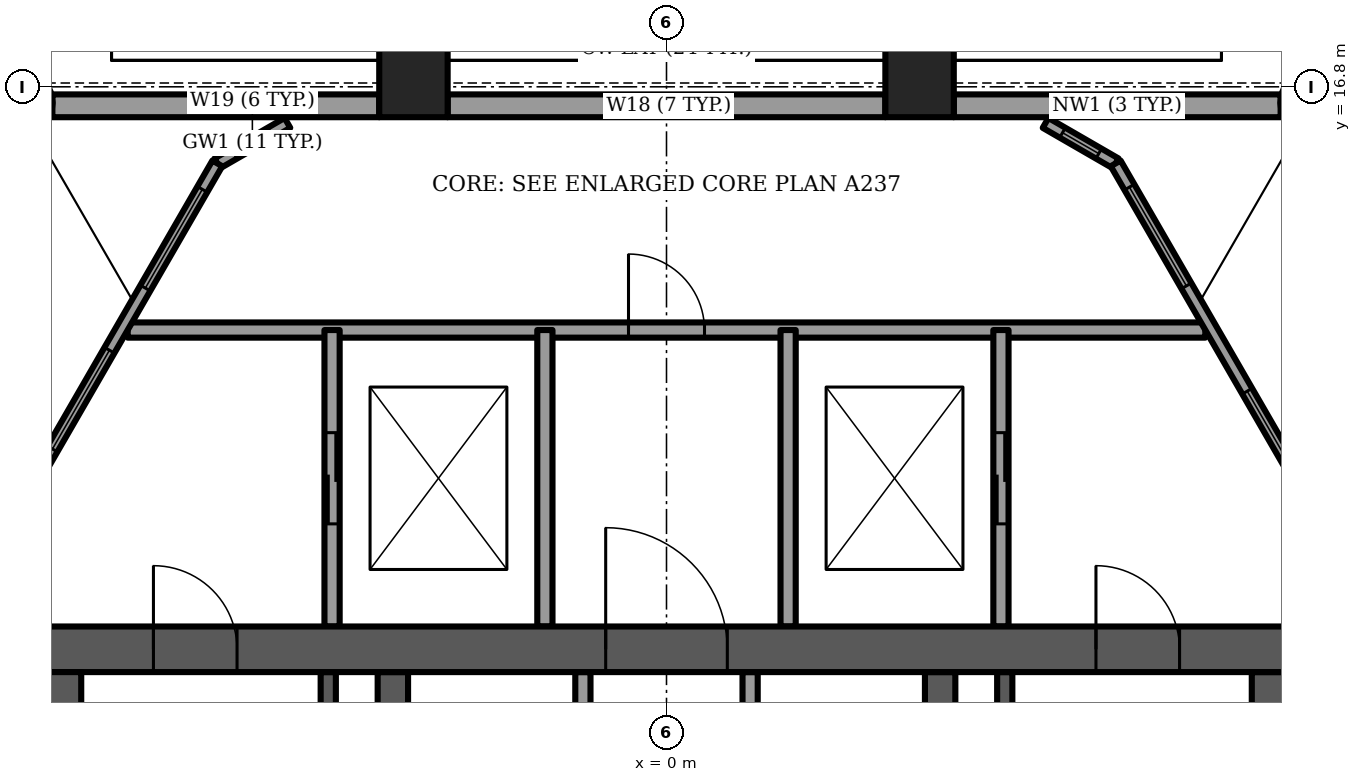
"""IFC4 building model, lengths in metres.
Left out: names, types, materials, properties, quantities, classifications, styles, units other than length and angle.
Written with IfcOpenShell. Run it as: python <this file> out.ifc"""

import sys

from ifc_helpers import new_model, si_unit, direction, frame, frame_2d, origin, origin_2d, place, context, subcontext, project, spatial, rectangle, circle, extrude, element, fill, save


model = new_model("IFC4")
c1 = context("Model", 3, precision=1e-05, world=origin(), true_north=direction((0.0, 1.0)))
c2 = subcontext(c1, "Body", "Model", "MODEL_VIEW")
j1 = project(units=[si_unit("LENGTHUNIT", "METRE"), si_unit("PLANEANGLEUNIT", "RADIAN")], contexts=[c1])
p1 = place(None, origin())
s1 = spatial("IfcSite", under=j1, at=p1, CompositionType="ELEMENT")
p2 = place(p1, origin())
s2 = spatial("IfcBuilding", under=s1, at=p2, CompositionType="ELEMENT")
p3 = place(p2, frame((0.0, 0.0, 256.25)))
s3 = spatial("IfcBuildingStorey", under=s2, at=p3, CompositionType="ELEMENT", Elevation=256.25)
for number, where, z_axis, x_axis in (
    (1, (-8.526, 16.589, -1.2), (0.0, 0.0, 1.0), (1.0, 0.0, 0.0)),
    (2, (8.526, 16.589, -1.2), (0.0, 0.0, 1.0), (1.0, 0.0, 0.0)),
):
    element("IfcColumn", number, at=place(p3, frame(where, z_axis=z_axis, x_axis=x_axis)), inside=s3, PredefinedType="COLUMN", context=c2, shape_type="SweptSolid", body=[
        extrude(circle(Radius=0.45, at=origin_2d()), origin(), (0.0, 0.0, 1.0), 3.75),
    ])
for number, where, z_axis, x_axis in (
    (3, (3.329, 16.85, -1.2), (0.0, 0.0, 1.0), (1.0, 0.0, 0.0)),
    (4, (-3.329, 16.85, -1.2), (0.0, 0.0, 1.0), (1.0, 0.0, 0.0)),
):
    element("IfcColumn", number, at=place(p3, frame(where, z_axis=z_axis, x_axis=x_axis)), inside=s3, PredefinedType="COLUMN", context=c2, shape_type="SweptSolid", body=[
        extrude(rectangle(XDim=0.9, YDim=0.9, at=origin_2d()), origin(), (0.0, 0.0, 1.0), 3.75),
    ])
p4 = place(p3, frame((-8.5, 9.4, -0.3), z_axis=(0.0, 0.0, 1.0), x_axis=(1.0, 0.0, 0.0)))
e5 = element("IfcWall", 5, at=p4, inside=s3, PredefinedType="SHEAR", context=c2, shape_type="SweptSolid", body=[
    extrude(rectangle(XDim=17.0, YDim=0.6, at=frame_2d((8.5, 0.0))), origin(), (0.0, 0.0, 1.0), 3.75),
])
p5 = place(p4, frame((7.7, 0.0, 0.0)))
e6 = element("IfcOpeningElement", 6, at=p5, cuts=e5, PredefinedType="OPENING", context=c2, shape_type="SweptSolid", body=[
    extrude(rectangle(XDim=1.6, YDim=2.1, at=frame_2d((0.8, 1.05))), frame((0.0, 0.3, 0.0), z_axis=(0.0, -1.0, 0.0), x_axis=(1.0, 0.0, 0.0)), (0.0, 0.0, 1.0), 0.6),
])
p6 = place(p4, frame((1.75, 0.0, 0.0)))
e7 = element("IfcOpeningElement", 7, at=p6, cuts=e5, PredefinedType="OPENING", context=c2, shape_type="SweptSolid", body=[
    extrude(rectangle(XDim=1.1, YDim=2.1, at=frame_2d((0.55, 1.05))), frame((0.0, 0.3, 0.0), z_axis=(0.0, -1.0, 0.0), x_axis=(1.0, 0.0, 0.0)), (0.0, 0.0, 1.0), 0.6),
])
p7 = place(p4, frame((14.15, 0.0, 0.0)))
e8 = element("IfcOpeningElement", 8, at=p7, cuts=e5, PredefinedType="OPENING", context=c2, shape_type="SweptSolid", body=[
    extrude(rectangle(XDim=1.1, YDim=2.1, at=frame_2d((0.55, 1.05))), frame((0.0, 0.3, 0.0), z_axis=(0.0, -1.0, 0.0), x_axis=(1.0, 0.0, 0.0)), (0.0, 0.0, 1.0), 0.6),
])
p8 = place(p3, frame((-8.1, -1.1, -0.3), z_axis=(0.0, 0.0, 1.0), x_axis=(0.0, 1.0, 0.0)))
e9 = element("IfcWall", 9, at=p8, inside=s3, PredefinedType="SHEAR", context=c2, shape_type="SweptSolid", body=[
    extrude(rectangle(XDim=10.2, YDim=0.8, at=frame_2d((5.1, 0.0))), origin(), (0.0, 0.0, 1.0), 3.75),
])
p9 = place(p8, frame((8.35, 0.0, 0.0)))
e10 = element("IfcOpeningElement", 10, at=p9, cuts=e9, PredefinedType="OPENING", context=c2, shape_type="SweptSolid", body=[
    extrude(rectangle(XDim=1.1, YDim=2.1, at=frame_2d((0.55, 1.05))), frame((0.0, 0.4, 0.0), z_axis=(0.0, -1.0, 0.0), x_axis=(1.0, 0.0, 0.0)), (0.0, 0.0, 1.0), 0.8),
])
p10 = place(p3, frame((8.1, -1.1, -0.3), z_axis=(0.0, 0.0, 1.0), x_axis=(0.0, 1.0, 0.0)))
e11 = element("IfcWall", 11, at=p10, inside=s3, PredefinedType="SHEAR", context=c2, shape_type="SweptSolid", body=[
    extrude(rectangle(XDim=10.2, YDim=0.8, at=frame_2d((5.1, 0.0))), origin(), (0.0, 0.0, 1.0), 3.75),
])
p11 = place(p10, frame((8.35, 0.0, 0.0)))
e12 = element("IfcOpeningElement", 12, at=p11, cuts=e11, PredefinedType="OPENING", context=c2, shape_type="SweptSolid", body=[
    extrude(rectangle(XDim=1.1, YDim=2.1, at=frame_2d((0.55, 1.05))), frame((0.0, 0.4, 0.0), z_axis=(0.0, -1.0, 0.0), x_axis=(1.0, 0.0, 0.0)), (0.0, 0.0, 1.0), 0.8),
])
for number, where, z_axis, x_axis in (
    (13, (-3.6, -1.1, -0.3), (0.0, 0.0, 1.0), (0.0, 1.0, 0.0)),
    (14, (3.6, -1.1, -0.3), (0.0, 0.0, 1.0), (0.0, 1.0, 0.0)),
):
    element("IfcWall", number, at=place(p3, frame(where, z_axis=z_axis, x_axis=x_axis)), inside=s3, PredefinedType="SHEAR", context=c2, shape_type="SweptSolid", body=[
        extrude(rectangle(XDim=10.2, YDim=0.4, at=frame_2d((5.1, 0.0))), origin(), (0.0, 0.0, 1.0), 3.75),
    ])
p12 = place(p3, frame((8.079, 16.55, 0.0), z_axis=(0.0, 0.0, 1.0), x_axis=(-1.0, 0.0, 0.0)))
e15 = element("IfcWall", 15, at=p12, inside=s3, PredefinedType="SOLIDWALL", context=c2, shape_type="SweptSolid", body=[
    extrude(rectangle(XDim=4.3, YDim=0.3, at=frame_2d((2.15, 0.0))), origin(), (0.0, 0.0, 1.0), 2.55),
])
p13 = place(p3, frame((2.879, 16.55, 0.0), z_axis=(0.0, 0.0, 1.0), x_axis=(-1.0, 0.0, 0.0)))
e16 = element("IfcWall", 16, at=p13, inside=s3, PredefinedType="SOLIDWALL", context=c2, shape_type="SweptSolid", body=[
    extrude(rectangle(XDim=5.759, YDim=0.3, at=frame_2d((2.879, 0.0))), origin(), (0.0, 0.0, 1.0), 2.55),
])
p14 = place(p13, frame((2.4, 0.0, 0.15)))
e17 = element("IfcOpeningElement", 17, at=p14, cuts=e16, PredefinedType="OPENING", context=c2, shape_type="SweptSolid", body=[
    extrude(rectangle(XDim=0.9, YDim=2.15, at=frame_2d((0.45, 1.075))), frame((0.0, 0.15, 0.0), z_axis=(0.0, -1.0, 0.0), x_axis=(1.0, 0.0, 0.0)), (0.0, 0.0, 1.0), 0.3),
])
p15 = place(p3, frame((-3.779, 16.55, 0.0), z_axis=(0.0, 0.0, 1.0), x_axis=(-1.0, 0.0, 0.0)))
e18 = element("IfcWall", 18, at=p15, inside=s3, PredefinedType="SOLIDWALL", context=c2, shape_type="SweptSolid", body=[
    extrude(rectangle(XDim=4.3, YDim=0.3, at=frame_2d((2.15, 0.0))), origin(), (0.0, 0.0, 1.0), 2.55),
])
p16 = place(p3, frame((-5.909, 15.792, 0.0), z_axis=(0.0, 0.0, 1.0), x_axis=(-0.500006153997, -0.866021850744, 0.0)))
e19 = element("IfcWall", 19, at=p16, inside=s3, PredefinedType="SOLIDWALL", context=c2, shape_type="SweptSolid", body=[
    extrude(rectangle(XDim=18.673, YDim=0.15, at=frame_2d((9.336, 0.0))), origin(), (0.0, 0.0, 1.0), 3.45),
])
p17 = place(p16, frame((2.838, 0.0, 0.15)))
e20 = element("IfcOpeningElement", 20, at=p17, cuts=e19, PredefinedType="OPENING", context=c2, shape_type="SweptSolid", body=[
    extrude(rectangle(XDim=1.5, YDim=2.85, at=frame_2d((0.75, 1.425))), frame((0.0, 0.075, 0.0), z_axis=(0.0, -1.0, 0.0), x_axis=(1.0, 0.0, 0.0)), (0.0, 0.0, 1.0), 0.15),
])
p18 = place(p16, frame((9.053, 0.0, 0.15)))
e21 = element("IfcOpeningElement", 21, at=p18, cuts=e19, PredefinedType="OPENING", context=c2, shape_type="SweptSolid", body=[
    extrude(rectangle(XDim=0.9, YDim=2.85, at=frame_2d((0.45, 1.425))), frame((0.0, 0.075, 0.0), z_axis=(0.0, -1.0, 0.0), x_axis=(1.0, 0.0, 0.0)), (0.0, 0.0, 1.0), 0.15),
])
p19 = place(p16, frame((6.953, 0.0, 0.15)))
e22 = element("IfcOpeningElement", 22, at=p19, cuts=e19, PredefinedType="OPENING", context=c2, shape_type="SweptSolid", body=[
    extrude(rectangle(XDim=1.4, YDim=2.85, at=frame_2d((0.7, 1.425))), frame((0.0, 0.075, 0.0), z_axis=(0.0, -1.0, 0.0), x_axis=(1.0, 0.0, 0.0)), (0.0, 0.0, 1.0), 0.15),
])
p20 = place(p16, frame((11.022, 0.0, 0.15)))
e23 = element("IfcOpeningElement", 23, at=p20, cuts=e19, PredefinedType="OPENING", context=c2, shape_type="SweptSolid", body=[
    extrude(rectangle(XDim=1.5, YDim=2.85, at=frame_2d((0.75, 1.425))), frame((0.0, 0.075, 0.0), z_axis=(0.0, -1.0, 0.0), x_axis=(1.0, 0.0, 0.0)), (0.0, 0.0, 1.0), 0.15),
])
p21 = place(p16, frame((13.222, 0.0, 0.15)))
e24 = element("IfcOpeningElement", 24, at=p21, cuts=e19, PredefinedType="OPENING", context=c2, shape_type="SweptSolid", body=[
    extrude(rectangle(XDim=1.4, YDim=2.85, at=frame_2d((0.7, 1.425))), frame((0.0, 0.075, 0.0), z_axis=(0.0, -1.0, 0.0), x_axis=(1.0, 0.0, 0.0)), (0.0, 0.0, 1.0), 0.15),
])
p22 = place(p16, frame((0.394, 0.0, 0.15)))
e25 = element("IfcOpeningElement", 25, at=p22, cuts=e19, PredefinedType="OPENING", context=c2, shape_type="SweptSolid", body=[
    extrude(rectangle(XDim=1.5, YDim=2.73, at=frame_2d((0.75, 1.365))), frame((0.0, 0.075, 0.0), z_axis=(0.0, -1.0, 0.0), x_axis=(1.0, 0.0, 0.0)), (0.0, 0.0, 1.0), 0.15),
])
p23 = place(p16, frame((16.316, 0.0, 0.15)))
e26 = element("IfcOpeningElement", 26, at=p23, cuts=e19, PredefinedType="OPENING", context=c2, shape_type="SweptSolid", body=[
    extrude(rectangle(XDim=1.5, YDim=2.73, at=frame_2d((0.75, 1.365))), frame((0.0, 0.075, 0.0), z_axis=(0.0, -1.0, 0.0), x_axis=(1.0, 0.0, 0.0)), (0.0, 0.0, 1.0), 0.15),
])
p24 = place(p3, frame((15.246, -0.378, 0.0), z_axis=(0.0, 0.0, 1.0), x_axis=(-0.500006153997, 0.866021850744, 0.0)))
e27 = element("IfcWall", 27, at=p24, inside=s3, PredefinedType="SOLIDWALL", context=c2, shape_type="SweptSolid", body=[
    extrude(rectangle(XDim=18.673, YDim=0.15, at=frame_2d((9.336, 0.0))), origin(), (0.0, 0.0, 1.0), 3.45),
])
p25 = place(p24, frame((4.051, 0.0, 0.15)))
e28 = element("IfcOpeningElement", 28, at=p25, cuts=e27, PredefinedType="OPENING", context=c2, shape_type="SweptSolid", body=[
    extrude(rectangle(XDim=0.9, YDim=2.85, at=frame_2d((0.45, 1.425))), frame((0.0, 0.075, 0.0), z_axis=(0.0, -1.0, 0.0), x_axis=(1.0, 0.0, 0.0)), (0.0, 0.0, 1.0), 0.15),
])
p26 = place(p24, frame((6.251, 0.0, 0.15)))
e29 = element("IfcOpeningElement", 29, at=p26, cuts=e27, PredefinedType="OPENING", context=c2, shape_type="SweptSolid", body=[
    extrude(rectangle(XDim=1.4, YDim=2.85, at=frame_2d((0.7, 1.425))), frame((0.0, 0.075, 0.0), z_axis=(0.0, -1.0, 0.0), x_axis=(1.0, 0.0, 0.0)), (0.0, 0.0, 1.0), 0.15),
])
p27 = place(p24, frame((8.251, 0.0, 0.15)))
e30 = element("IfcOpeningElement", 30, at=p27, cuts=e27, PredefinedType="OPENING", context=c2, shape_type="SweptSolid", body=[
    extrude(rectangle(XDim=0.9, YDim=2.85, at=frame_2d((0.45, 1.425))), frame((0.0, 0.075, 0.0), z_axis=(0.0, -1.0, 0.0), x_axis=(1.0, 0.0, 0.0)), (0.0, 0.0, 1.0), 0.15),
])
p28 = place(p24, frame((10.451, 0.0, 0.15)))
e31 = element("IfcOpeningElement", 31, at=p28, cuts=e27, PredefinedType="OPENING", context=c2, shape_type="SweptSolid", body=[
    extrude(rectangle(XDim=1.4, YDim=2.85, at=frame_2d((0.7, 1.425))), frame((0.0, 0.075, 0.0), z_axis=(0.0, -1.0, 0.0), x_axis=(1.0, 0.0, 0.0)), (0.0, 0.0, 1.0), 0.15),
])
p29 = place(p24, frame((13.712, 0.0, 0.15)))
e32 = element("IfcOpeningElement", 32, at=p29, cuts=e27, PredefinedType="OPENING", context=c2, shape_type="SweptSolid", body=[
    extrude(rectangle(XDim=1.5, YDim=2.85, at=frame_2d((0.75, 1.425))), frame((0.0, 0.075, 0.0), z_axis=(0.0, -1.0, 0.0), x_axis=(1.0, 0.0, 0.0)), (0.0, 0.0, 1.0), 0.15),
])
p30 = place(p24, frame((1.075, 0.0, 0.15)))
e33 = element("IfcOpeningElement", 33, at=p30, cuts=e27, PredefinedType="OPENING", context=c2, shape_type="SweptSolid", body=[
    extrude(rectangle(XDim=1.5, YDim=2.73, at=frame_2d((0.75, 1.365))), frame((0.0, 0.075, 0.0), z_axis=(0.0, -1.0, 0.0), x_axis=(1.0, 0.0, 0.0)), (0.0, 0.0, 1.0), 0.15),
])
p31 = place(p24, frame((16.812, 0.0, 0.15)))
e34 = element("IfcOpeningElement", 34, at=p31, cuts=e27, PredefinedType="OPENING", context=c2, shape_type="SweptSolid", body=[
    extrude(rectangle(XDim=1.5, YDim=2.73, at=frame_2d((0.75, 1.365))), frame((0.0, 0.075, 0.0), z_axis=(0.0, -1.0, 0.0), x_axis=(1.0, 0.0, 0.0)), (0.0, 0.0, 1.0), 0.15),
])
p32 = place(p3, frame((-4.987, 16.325, 0.0), z_axis=(0.0, 0.0, 1.0), x_axis=(-0.865990848561, -0.500059846627, 0.0)))
e35 = element("IfcWall", 35, at=p32, inside=s3, PredefinedType="SOLIDWALL", context=c2, shape_type="SweptSolid", body=[
    extrude(rectangle(XDim=1.065, YDim=0.15, at=frame_2d((0.532, 0.0))), origin(), (0.0, 0.0, 1.0), 3.45),
])
p33 = place(p32, frame((0.258, 0.0, 0.15)))
e36 = element("IfcOpeningElement", 36, at=p33, cuts=e35, PredefinedType="OPENING", context=c2, shape_type="SweptSolid", body=[
    extrude(rectangle(XDim=0.55, YDim=2.85, at=frame_2d((0.275, 1.425))), frame((0.0, 0.075, 0.0), z_axis=(0.0, -1.0, 0.0), x_axis=(1.0, 0.0, 0.0)), (0.0, 0.0, 1.0), 0.15),
])
p34 = place(p3, frame((5.909, 15.792, 0.0), z_axis=(0.0, 0.0, 1.0), x_axis=(-0.865990848561, 0.500059846627, 0.0)))
e37 = element("IfcWall", 37, at=p34, inside=s3, PredefinedType="SOLIDWALL", context=c2, shape_type="SweptSolid", body=[
    extrude(rectangle(XDim=1.065, YDim=0.15, at=frame_2d((0.532, 0.0))), origin(), (0.0, 0.0, 1.0), 3.45),
])
p35 = place(p34, frame((0.258, 0.0, 0.15)))
e38 = element("IfcOpeningElement", 38, at=p35, cuts=e37, PredefinedType="OPENING", context=c2, shape_type="SweptSolid", body=[
    extrude(rectangle(XDim=0.55, YDim=2.85, at=frame_2d((0.275, 1.425))), frame((0.0, 0.075, 0.0), z_axis=(0.0, -1.0, 0.0), x_axis=(1.0, 0.0, 0.0)), (0.0, 0.0, 1.0), 0.15),
])
for number, where, z_axis, x_axis in (
    (39, (-1.1, 6.2, 0.0), (0.0, 0.0, 1.0), (0.0, 1.0, 0.0)),
    (40, (1.1, 6.2, 0.0), (0.0, 0.0, 1.0), (0.0, 1.0, 0.0)),
):
    element("IfcWall", number, at=place(p3, frame(where, z_axis=z_axis, x_axis=x_axis)), inside=s3, PredefinedType="PARTITIONING", context=c2, shape_type="SweptSolid", body=[
        extrude(rectangle(XDim=2.9, YDim=0.2, at=frame_2d((1.45, 0.0))), origin(), (0.0, 0.0, 1.0), 3.45),
    ])
for number, where, z_axis, x_axis in (
    (41, (-4.45, 0.9, -0.3), (0.0, 0.0, 1.0), (0.0, 1.0, 0.0)),
    (42, (4.45, 0.9, -0.3), (0.0, 0.0, 1.0), (0.0, 1.0, 0.0)),
):
    element("IfcWall", number, at=place(p3, frame(where, z_axis=z_axis, x_axis=x_axis)), inside=s3, PredefinedType="SOLIDWALL", context=c2, shape_type="SweptSolid", body=[
        extrude(rectangle(XDim=8.2, YDim=0.2, at=frame_2d((4.1, 0.0))), origin(), (0.0, 0.0, 1.0), 3.75),
    ])
p36 = place(p3, frame((-7.089, 13.6, 0.0), z_axis=(0.0, 0.0, 1.0), x_axis=(1.0, 0.0, 0.0)))
e43 = element("IfcWall", 43, at=p36, inside=s3, PredefinedType="PARTITIONING", context=c2, shape_type="SweptSolid", body=[
    extrude(rectangle(XDim=14.177, YDim=0.2, at=frame_2d((7.089, 0.0))), origin(), (0.0, 0.0, 1.0), 3.45),
])
p37 = place(p36, frame((6.589, 0.0, 0.0)))
e44 = element("IfcOpeningElement", 44, at=p37, cuts=e43, PredefinedType="OPENING", context=c2, shape_type="SweptSolid", body=[
    extrude(rectangle(XDim=1.0, YDim=2.1, at=frame_2d((0.5, 1.05))), frame((0.0, 0.1, 0.0), z_axis=(0.0, -1.0, 0.0), x_axis=(1.0, 0.0, 0.0)), (0.0, 0.0, 1.0), 0.2),
])
p38 = place(p3, frame((-4.4, 9.7, 0.0), z_axis=(0.0, 0.0, 1.0), x_axis=(0.0, 1.0, 0.0)))
e45 = element("IfcWall", 45, at=p38, inside=s3, PredefinedType="PARTITIONING", context=c2, shape_type="SweptSolid", body=[
    extrude(rectangle(XDim=3.9, YDim=0.2, at=frame_2d((1.95, 0.0))), origin(), (0.0, 0.0, 1.0), 3.45),
])
p39 = place(p38, frame((1.35, 0.0, 0.0)))
e46 = element("IfcOpeningElement", 46, at=p39, cuts=e45, PredefinedType="OPENING", context=c2, shape_type="SweptSolid", body=[
    extrude(rectangle(XDim=1.2, YDim=2.1, at=frame_2d((0.6, 1.05))), frame((0.0, 0.1, 0.0), z_axis=(0.0, -1.0, 0.0), x_axis=(1.0, 0.0, 0.0)), (0.0, 0.0, 1.0), 0.2),
])
p40 = place(p3, frame((4.4, 9.7, 0.0), z_axis=(0.0, 0.0, 1.0), x_axis=(0.0, 1.0, 0.0)))
e47 = element("IfcWall", 47, at=p40, inside=s3, PredefinedType="PARTITIONING", context=c2, shape_type="SweptSolid", body=[
    extrude(rectangle(XDim=3.9, YDim=0.2, at=frame_2d((1.95, 0.0))), origin(), (0.0, 0.0, 1.0), 3.45),
])
p41 = place(p40, frame((1.35, 0.0, 0.0)))
e48 = element("IfcOpeningElement", 48, at=p41, cuts=e47, PredefinedType="OPENING", context=c2, shape_type="SweptSolid", body=[
    extrude(rectangle(XDim=1.2, YDim=2.1, at=frame_2d((0.6, 1.05))), frame((0.0, 0.1, 0.0), z_axis=(0.0, -1.0, 0.0), x_axis=(1.0, 0.0, 0.0)), (0.0, 0.0, 1.0), 0.2),
])
for number, where, z_axis, x_axis in (
    (49, (-1.6, 9.7, 0.0), (0.0, 0.0, 1.0), (0.0, 1.0, 0.0)),
    (50, (1.6, 9.7, 0.0), (0.0, 0.0, 1.0), (0.0, 1.0, 0.0)),
):
    element("IfcWall", number, at=place(p3, frame(where, z_axis=z_axis, x_axis=x_axis)), inside=s3, PredefinedType="PARTITIONING", context=c2, shape_type="SweptSolid", body=[
        extrude(rectangle(XDim=3.9, YDim=0.2, at=frame_2d((1.95, 0.0))), origin(), (0.0, 0.0, 1.0), 3.45),
    ])
p42 = place(p14, origin())
e51 = element("IfcWindow", 51, at=p42, inside=s3, PartitioningType="SINGLE_PANEL", PredefinedType="WINDOW", context=c2, shape_type="SweptSolid", body=[
    extrude(rectangle(XDim=0.9, YDim=2.15, at=frame_2d((0.45, 1.075))), frame((0.0, 0.03, 0.0), z_axis=(0.0, -1.0, 0.0), x_axis=(1.0, 0.0, 0.0)), (0.0, 0.0, 1.0), 0.06),
])
fill(e17, e51)
p43 = place(p17, origin())
e52 = element("IfcWindow", 52, at=p43, inside=s3, PartitioningType="SINGLE_PANEL", PredefinedType="WINDOW", context=c2, shape_type="SweptSolid", body=[
    extrude(rectangle(XDim=1.5, YDim=2.85, at=frame_2d((0.75, 1.425))), frame((0.0, 0.03, 0.0), z_axis=(0.0, -1.0, 0.0), x_axis=(1.0, 0.0, 0.0)), (0.0, 0.0, 1.0), 0.06),
])
fill(e20, e52)
p44 = place(p22, origin())
e53 = element("IfcWindow", 53, at=p44, inside=s3, PartitioningType="SINGLE_PANEL", PredefinedType="WINDOW", context=c2, shape_type="SweptSolid", body=[
    extrude(rectangle(XDim=1.5, YDim=2.73, at=frame_2d((0.75, 1.365))), frame((0.0, 0.03, 0.0), z_axis=(0.0, -1.0, 0.0), x_axis=(1.0, 0.0, 0.0)), (0.0, 0.0, 1.0), 0.06),
])
fill(e25, e53)
p45 = place(p29, origin())
e54 = element("IfcWindow", 54, at=p45, inside=s3, PartitioningType="SINGLE_PANEL", PredefinedType="WINDOW", context=c2, shape_type="SweptSolid", body=[
    extrude(rectangle(XDim=1.5, YDim=2.85, at=frame_2d((0.75, 1.425))), frame((0.0, 0.03, 0.0), z_axis=(0.0, -1.0, 0.0), x_axis=(1.0, 0.0, 0.0)), (0.0, 0.0, 1.0), 0.06),
])
fill(e32, e54)
p46 = place(p31, origin())
e55 = element("IfcWindow", 55, at=p46, inside=s3, PartitioningType="SINGLE_PANEL", PredefinedType="WINDOW", context=c2, shape_type="SweptSolid", body=[
    extrude(rectangle(XDim=1.5, YDim=2.73, at=frame_2d((0.75, 1.365))), frame((0.0, 0.03, 0.0), z_axis=(0.0, -1.0, 0.0), x_axis=(1.0, 0.0, 0.0)), (0.0, 0.0, 1.0), 0.06),
])
fill(e34, e55)
p47 = place(p33, origin())
e56 = element("IfcWindow", 56, at=p47, inside=s3, PartitioningType="SINGLE_PANEL", PredefinedType="WINDOW", context=c2, shape_type="SweptSolid", body=[
    extrude(rectangle(XDim=0.55, YDim=2.85, at=frame_2d((0.275, 1.425))), frame((0.0, 0.03, 0.0), z_axis=(0.0, -1.0, 0.0), x_axis=(1.0, 0.0, 0.0)), (0.0, 0.0, 1.0), 0.06),
])
fill(e36, e56)
p48 = place(p35, origin())
e57 = element("IfcWindow", 57, at=p48, inside=s3, PartitioningType="SINGLE_PANEL", PredefinedType="WINDOW", context=c2, shape_type="SweptSolid", body=[
    extrude(rectangle(XDim=0.55, YDim=2.85, at=frame_2d((0.275, 1.425))), frame((0.0, 0.03, 0.0), z_axis=(0.0, -1.0, 0.0), x_axis=(1.0, 0.0, 0.0)), (0.0, 0.0, 1.0), 0.06),
])
fill(e38, e57)
p49 = place(p5, origin())
e58 = element("IfcDoor", 58, at=p49, inside=s3, OperationType="DOUBLE_DOOR_SINGLE_SWING", PredefinedType="DOOR", context=c2, shape_type="SweptSolid", body=[
    extrude(rectangle(XDim=1.6, YDim=2.1, at=frame_2d((0.8, 1.05))), frame((0.0, 0.025, 0.0), z_axis=(0.0, -1.0, 0.0), x_axis=(1.0, 0.0, 0.0)), (0.0, 0.0, 1.0), 0.05),
])
fill(e6, e58)
p50 = place(p6, origin())
e59 = element("IfcDoor", 59, at=p50, inside=s3, OperationType="SINGLE_SWING_LEFT", PredefinedType="DOOR", context=c2, shape_type="SweptSolid", body=[
    extrude(rectangle(XDim=1.1, YDim=2.1, at=frame_2d((0.55, 1.05))), frame((0.0, 0.025, 0.0), z_axis=(0.0, -1.0, 0.0), x_axis=(1.0, 0.0, 0.0)), (0.0, 0.0, 1.0), 0.05),
])
fill(e7, e59)
p51 = place(p7, origin())
e60 = element("IfcDoor", 60, at=p51, inside=s3, OperationType="SINGLE_SWING_RIGHT", PredefinedType="DOOR", context=c2, shape_type="SweptSolid", body=[
    extrude(rectangle(XDim=1.1, YDim=2.1, at=frame_2d((0.55, 1.05))), frame((0.0, 0.025, 0.0), z_axis=(0.0, -1.0, 0.0), x_axis=(1.0, 0.0, 0.0)), (0.0, 0.0, 1.0), 0.05),
])
fill(e8, e60)
p52 = place(p39, origin())
e61 = element("IfcDoor", 61, at=p52, inside=s3, OperationType="SLIDING_TO_LEFT", PredefinedType="DOOR", context=c2, shape_type="SweptSolid", body=[
    extrude(rectangle(XDim=1.2, YDim=2.1, at=frame_2d((0.6, 1.05))), frame((0.0, 0.025, 0.0), z_axis=(0.0, -1.0, 0.0), x_axis=(1.0, 0.0, 0.0)), (0.0, 0.0, 1.0), 0.05),
])
fill(e46, e61)
p53 = place(p41, origin())
e62 = element("IfcDoor", 62, at=p53, inside=s3, OperationType="SLIDING_TO_LEFT", PredefinedType="DOOR", context=c2, shape_type="SweptSolid", body=[
    extrude(rectangle(XDim=1.2, YDim=2.1, at=frame_2d((0.6, 1.05))), frame((0.0, 0.025, 0.0), z_axis=(0.0, -1.0, 0.0), x_axis=(1.0, 0.0, 0.0)), (0.0, 0.0, 1.0), 0.05),
])
fill(e48, e62)
p54 = place(p37, origin())
e63 = element("IfcDoor", 63, at=p54, inside=s3, OperationType="SINGLE_SWING_LEFT", PredefinedType="DOOR", context=c2, shape_type="SweptSolid", body=[
    extrude(rectangle(XDim=1.0, YDim=2.1, at=frame_2d((0.5, 1.05))), frame((0.0, 0.025, 0.0), z_axis=(0.0, -1.0, 0.0), x_axis=(1.0, 0.0, 0.0)), (0.0, 0.0, 1.0), 0.05),
])
fill(e44, e63)
save(model, sys.argv[1])
